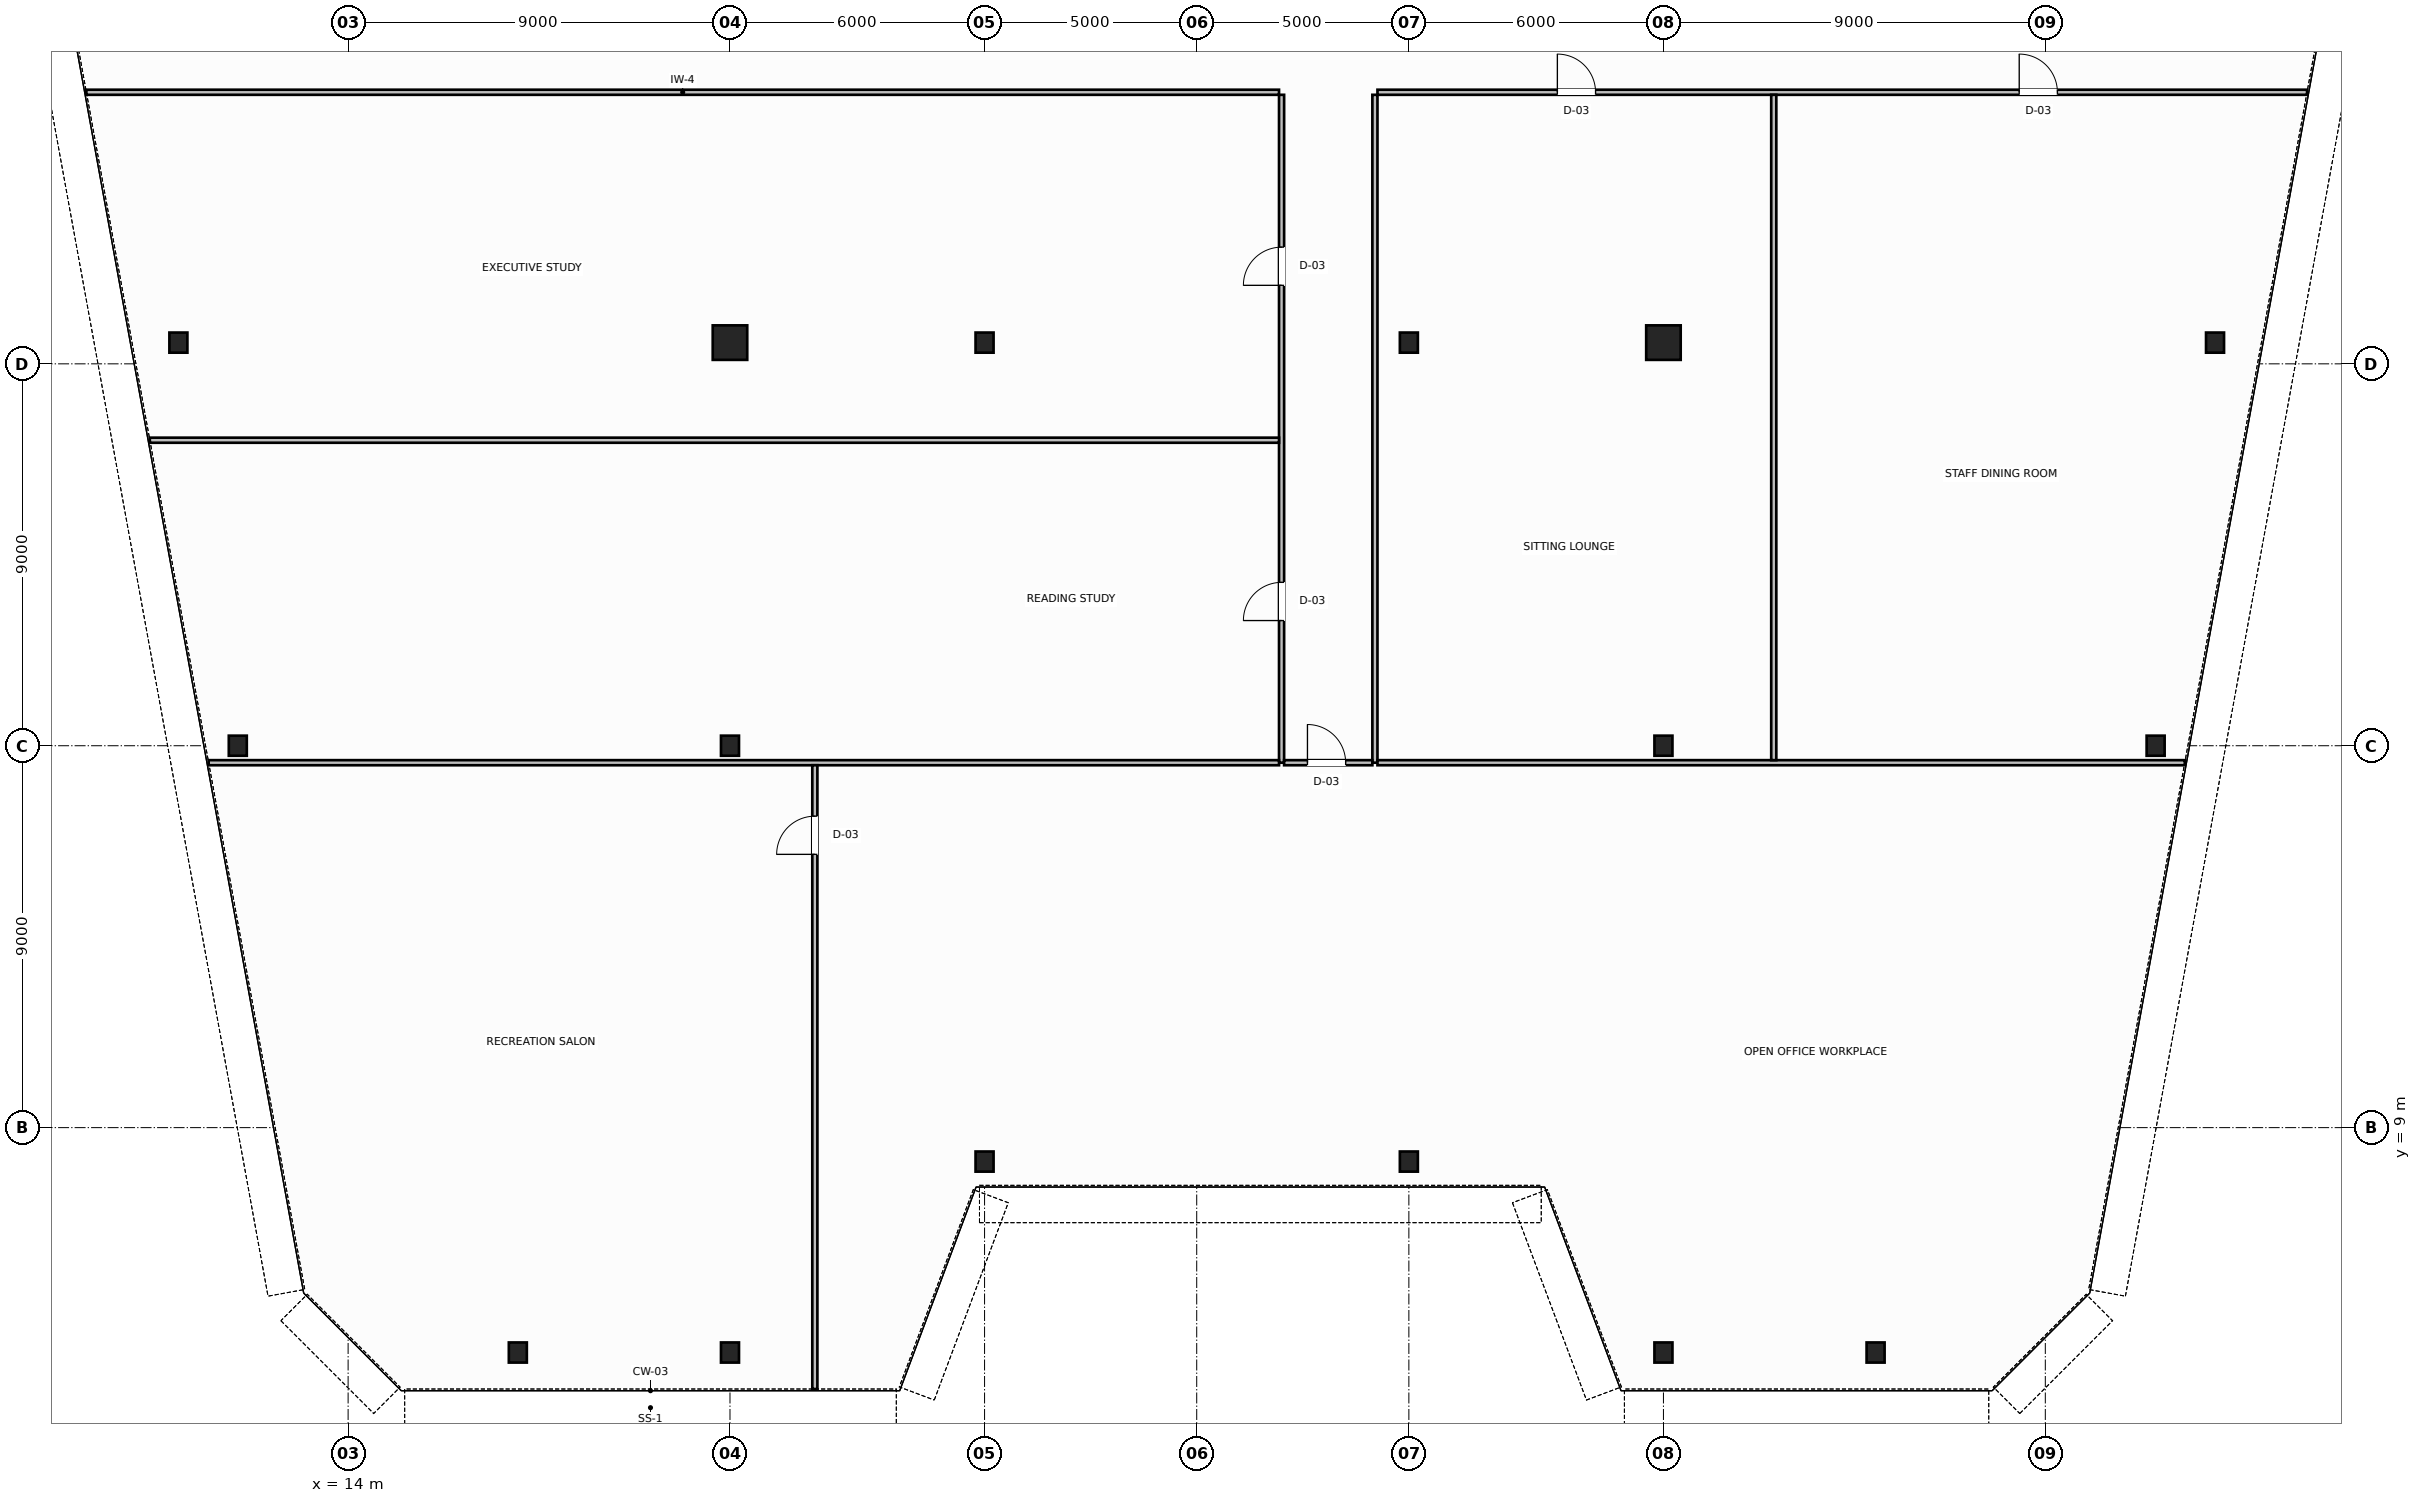
"""IFC4 building model, lengths in metres.
Left out: names, types, materials, properties, quantities, classifications, styles, units other than length and angle.
Written with IfcOpenShell. Run it as: python <this file> out.ifc"""

import sys

from ifc_helpers import new_model, si_unit, direction, frame, frame_2d, origin, origin_2d, place, context, subcontext, project, spatial, rectangle, hollow_circle, i_section, extrude, source, transform, mapped, element, fill, save


model = new_model("IFC4")
c1 = context("Model", 3, precision=1e-05, world=origin(), true_north=direction((0.0, 1.0)))
c2 = subcontext(c1, "Body", "Model", "MODEL_VIEW")
j1 = project(units=[si_unit("LENGTHUNIT", "METRE"), si_unit("PLANEANGLEUNIT", "RADIAN")], contexts=[c1])
p1 = place(None, origin())
s1 = spatial("IfcSite", under=j1, at=p1, CompositionType="ELEMENT")
p2 = place(p1, origin())
s2 = spatial("IfcBuilding", under=s1, at=p2, CompositionType="ELEMENT")
p3 = place(p2, frame((0.0, 0.0, 165.2)))
s3 = spatial("IfcBuildingStorey", under=s2, at=p3, CompositionType="ELEMENT", Elevation=165.2)
m1 = source(origin(), c2, "Body", "SweptSolid", [
    extrude(i_section(OverallWidth=0.424, OverallDepth=0.474, WebThickness=0.047, FlangeThickness=0.065, FilletRadius=0.015, at=origin_2d()), origin(), (0.0, 0.0, 1.0), 3.8),
])
for number, where, z_axis, x_axis in (
    (1, (10.0, 27.5, 0.0), (0.0, 0.0, 1.0), (1.0, 0.0, 0.0)),
    (2, (11.4, 18.0, 0.0), (0.0, 0.0, 1.0), (1.0, 0.0, 0.0)),
    (3, (58.0, 27.5, 0.0), (0.0, 0.0, 1.0), (1.0, 0.0, 0.0)),
    (4, (56.6, 18.0, 0.0), (0.0, 0.0, 1.0), (1.0, 0.0, 0.0)),
):
    element("IfcColumn", number, at=place(p3, frame(where, z_axis=z_axis, x_axis=x_axis)), inside=s3, PredefinedType="COLUMN", context=c2, shape_type="MappedRepresentation", body=[
        mapped(m1, transform((0.0, 0.0, 0.0), scale=1.0)),
    ])
m2 = source(origin(), c2, "Body", "SweptSolid", [
    extrude(hollow_circle(Radius=0.406, WallThickness=0.04, at=origin_2d()), origin(), (0.0, 0.0, 1.0), 3.8),
])
p4 = place(p3, frame((23.0, 27.5, 0.0), z_axis=(0.0, 0.0, 1.0), x_axis=(1.0, 0.0, 0.0)))
e5 = element("IfcColumn", 5, at=p4, inside=s3, PredefinedType="COLUMN", context=c2, shape_type="MappedRepresentation", body=[
    mapped(m2, transform((0.0, 0.0, 0.0), scale=1.0)),
])
m3 = source(origin(), c2, "Body", "SweptSolid", [
    extrude(i_section(OverallWidth=0.424, OverallDepth=0.474, WebThickness=0.047, FlangeThickness=0.065, FilletRadius=0.015, at=origin_2d()), origin(), (0.0, 0.0, 1.0), 3.8),
])
for number, where, z_axis, x_axis in (
    (6, (29.0, 27.5, 0.0), (0.0, 0.0, 1.0), (1.0, 0.0, 0.0)),
    (7, (39.0, 27.5, 0.0), (0.0, 0.0, 1.0), (1.0, 0.0, 0.0)),
):
    element("IfcColumn", number, at=place(p3, frame(where, z_axis=z_axis, x_axis=x_axis)), inside=s3, PredefinedType="COLUMN", context=c2, shape_type="MappedRepresentation", body=[
        mapped(m3, transform((0.0, 0.0, 0.0), scale=1.0)),
    ])
p5 = place(p3, frame((45.0, 27.5, 0.0), z_axis=(0.0, 0.0, 1.0), x_axis=(1.0, 0.0, 0.0)))
e8 = element("IfcColumn", 8, at=p5, inside=s3, PredefinedType="COLUMN", context=c2, shape_type="MappedRepresentation", body=[
    mapped(m2, transform((0.0, 0.0, 0.0), scale=1.0)),
])
for number, where, z_axis, x_axis in (
    (9, (23.0, 18.0, 0.0), (0.0, 0.0, 1.0), (1.0, 0.0, 0.0)),
    (10, (45.0, 18.0, 0.0), (0.0, 0.0, 1.0), (1.0, 0.0, 0.0)),
    (11, (18.0, 3.7, 0.0), (0.0, 0.0, 1.0), (1.0, 0.0, 0.0)),
    (12, (23.0, 3.7, 0.0), (0.0, 0.0, 1.0), (1.0, 0.0, 0.0)),
    (13, (29.0, 8.2, 0.0), (0.0, 0.0, 1.0), (1.0, 0.0, 0.0)),
    (14, (39.0, 8.2, 0.0), (0.0, 0.0, 1.0), (1.0, 0.0, 0.0)),
    (15, (45.0, 3.7, 0.0), (0.0, 0.0, 1.0), (1.0, 0.0, 0.0)),
    (16, (50.0, 3.7, 0.0), (0.0, 0.0, 1.0), (1.0, 0.0, 0.0)),
):
    element("IfcColumn", number, at=place(p3, frame(where, z_axis=z_axis, x_axis=x_axis)), inside=s3, PredefinedType="COLUMN", context=c2, shape_type="MappedRepresentation", body=[
        mapped(m3, transform((0.0, 0.0, 0.0), scale=1.0)),
    ])
p6 = place(p3, frame((7.831, 33.4, 0.0), z_axis=(0.0, 0.0, 1.0), x_axis=(1.0, 0.0, 0.0)))
e17 = element("IfcWall", 17, at=p6, inside=s3, PredefinedType="PARTITIONING", context=c2, shape_type="SweptSolid", body=[
    extrude(rectangle(XDim=28.109, YDim=0.12, at=frame_2d((14.055, 0.0))), origin(), (0.0, 0.0, 1.0), 3.58),
])
p7 = place(p3, frame((38.26, 33.4, 0.0), z_axis=(0.0, 0.0, 1.0), x_axis=(1.0, 0.0, 0.0)))
e18 = element("IfcWall", 18, at=p7, inside=s3, PredefinedType="PARTITIONING", context=c2, shape_type="SweptSolid", body=[
    extrude(rectangle(XDim=21.909, YDim=0.12, at=frame_2d((10.955, 0.0))), origin(), (0.0, 0.0, 1.0), 3.58),
])
p8 = place(p7, frame((4.24, 0.0, 0.0)))
e19 = element("IfcOpeningElement", 19, at=p8, cuts=e18, PredefinedType="OPENING", context=c2, shape_type="SweptSolid", body=[
    extrude(rectangle(XDim=0.9, YDim=2.15, at=frame_2d((0.45, 1.075))), frame((0.0, 0.07, 0.0), z_axis=(0.0, -1.0, 0.0), x_axis=(1.0, 0.0, 0.0)), (0.0, 0.0, 1.0), 0.14),
])
p9 = place(p7, frame((15.125, 0.0, 0.0)))
e20 = element("IfcOpeningElement", 20, at=p9, cuts=e18, PredefinedType="OPENING", context=c2, shape_type="SweptSolid", body=[
    extrude(rectangle(XDim=0.9, YDim=2.15, at=frame_2d((0.45, 1.075))), frame((0.0, 0.07, 0.0), z_axis=(0.0, -1.0, 0.0), x_axis=(1.0, 0.0, 0.0)), (0.0, 0.0, 1.0), 0.14),
])
p10 = place(p3, frame((36.0, 17.6, 0.0), z_axis=(0.0, 0.0, 1.0), x_axis=(0.0, 1.0, 0.0)))
e21 = element("IfcWall", 21, at=p10, inside=s3, PredefinedType="PARTITIONING", context=c2, shape_type="SweptSolid", body=[
    extrude(rectangle(XDim=15.74, YDim=0.12, at=frame_2d((7.87, 0.0))), origin(), (0.0, 0.0, 1.0), 3.58),
])
p11 = place(p10, frame((3.35, 0.0, 0.0)))
e22 = element("IfcOpeningElement", 22, at=p11, cuts=e21, PredefinedType="OPENING", context=c2, shape_type="SweptSolid", body=[
    extrude(rectangle(XDim=0.9, YDim=2.15, at=frame_2d((0.45, 1.075))), frame((0.0, 0.07, 0.0), z_axis=(0.0, -1.0, 0.0), x_axis=(1.0, 0.0, 0.0)), (0.0, 0.0, 1.0), 0.14),
])
p12 = place(p10, frame((11.25, 0.0, 0.0)))
e23 = element("IfcOpeningElement", 23, at=p12, cuts=e21, PredefinedType="OPENING", context=c2, shape_type="SweptSolid", body=[
    extrude(rectangle(XDim=0.9, YDim=2.15, at=frame_2d((0.45, 1.075))), frame((0.0, 0.07, 0.0), z_axis=(0.0, -1.0, 0.0), x_axis=(1.0, 0.0, 0.0)), (0.0, 0.0, 1.0), 0.14),
])
p13 = place(p3, frame((38.2, 17.6, 0.0), z_axis=(0.0, 0.0, 1.0), x_axis=(0.0, 1.0, 0.0)))
e24 = element("IfcWall", 24, at=p13, inside=s3, PredefinedType="PARTITIONING", context=c2, shape_type="SweptSolid", body=[
    extrude(rectangle(XDim=15.74, YDim=0.12, at=frame_2d((7.87, 0.0))), origin(), (0.0, 0.0, 1.0), 3.58),
])
p14 = place(p3, frame((36.06, 17.6, 0.0), z_axis=(0.0, 0.0, 1.0), x_axis=(1.0, 0.0, 0.0)))
e25 = element("IfcWall", 25, at=p14, inside=s3, PredefinedType="PARTITIONING", context=c2, shape_type="SweptSolid", body=[
    extrude(rectangle(XDim=2.08, YDim=0.12, at=frame_2d((1.04, 0.0))), origin(), (0.0, 0.0, 1.0), 3.58),
])
p15 = place(p14, frame((0.55, 0.0, 0.0)))
e26 = element("IfcOpeningElement", 26, at=p15, cuts=e25, PredefinedType="OPENING", context=c2, shape_type="SweptSolid", body=[
    extrude(rectangle(XDim=0.9, YDim=2.15, at=frame_2d((0.45, 1.075))), frame((0.0, 0.07, 0.0), z_axis=(0.0, -1.0, 0.0), x_axis=(1.0, 0.0, 0.0)), (0.0, 0.0, 1.0), 0.14),
])
p16 = place(p3, frame((10.713, 17.6, 0.0), z_axis=(0.0, 0.0, 1.0), x_axis=(1.0, 0.0, 0.0)))
e27 = element("IfcWall", 27, at=p16, inside=s3, PredefinedType="PARTITIONING", context=c2, shape_type="SweptSolid", body=[
    extrude(rectangle(XDim=25.227, YDim=0.12, at=frame_2d((12.614, 0.0))), origin(), (0.0, 0.0, 1.0), 3.58),
])
p17 = place(p3, frame((38.26, 17.6, 0.0), z_axis=(0.0, 0.0, 1.0), x_axis=(1.0, 0.0, 0.0)))
e28 = element("IfcWall", 28, at=p17, inside=s3, PredefinedType="PARTITIONING", context=c2, shape_type="SweptSolid", body=[
    extrude(rectangle(XDim=19.027, YDim=0.12, at=frame_2d((9.514, 0.0))), origin(), (0.0, 0.0, 1.0), 3.58),
])
p18 = place(p3, frame((25.0, 2.84, 0.0), z_axis=(0.0, 0.0, 1.0), x_axis=(0.0, 1.0, 0.0)))
e29 = element("IfcWall", 29, at=p18, inside=s3, PredefinedType="PARTITIONING", context=c2, shape_type="SweptSolid", body=[
    extrude(rectangle(XDim=14.7, YDim=0.12, at=frame_2d((7.35, 0.0))), origin(), (0.0, 0.0, 1.0), 3.58),
])
p19 = place(p18, frame((12.6, 0.0, 0.0)))
e30 = element("IfcOpeningElement", 30, at=p19, cuts=e29, PredefinedType="OPENING", context=c2, shape_type="SweptSolid", body=[
    extrude(rectangle(XDim=0.9, YDim=2.15, at=frame_2d((0.45, 1.075))), frame((0.0, 0.07, 0.0), z_axis=(0.0, -1.0, 0.0), x_axis=(1.0, 0.0, 0.0)), (0.0, 0.0, 1.0), 0.14),
])
p20 = place(p3, frame((9.327, 25.2, 0.0), z_axis=(0.0, 0.0, 1.0), x_axis=(1.0, 0.0, 0.0)))
e31 = element("IfcWall", 31, at=p20, inside=s3, PredefinedType="PARTITIONING", context=c2, shape_type="SweptSolid", body=[
    extrude(rectangle(XDim=26.613, YDim=0.12, at=frame_2d((13.307, 0.0))), origin(), (0.0, 0.0, 1.0), 3.58),
])
p21 = place(p3, frame((47.6, 17.66, 0.0), z_axis=(0.0, 0.0, 1.0), x_axis=(0.0, 1.0, 0.0)))
e32 = element("IfcWall", 32, at=p21, inside=s3, PredefinedType="PARTITIONING", context=c2, shape_type="SweptSolid", body=[
    extrude(rectangle(XDim=15.68, YDim=0.12, at=frame_2d((7.84, 0.0))), origin(), (0.0, 0.0, 1.0), 3.58),
])
m4 = source(origin(), c2, "Body", "SweptSolid", [
    extrude(rectangle(XDim=0.9, YDim=2.15, at=frame_2d((0.45, 1.075))), frame((0.0, 0.025, 0.0), z_axis=(0.0, -1.0, 0.0), x_axis=(1.0, 0.0, 0.0)), (0.0, 0.0, 1.0), 0.05),
])
p22 = place(p19, origin())
e33 = element("IfcDoor", 33, at=p22, inside=s3, OperationType="SINGLE_SWING_RIGHT", PredefinedType="DOOR", context=c2, shape_type="MappedRepresentation", body=[
    mapped(m4, transform((0.0, 0.0, 0.0), scale=1.0)),
])
fill(e30, e33)
p23 = place(p15, origin())
e34 = element("IfcDoor", 34, at=p23, inside=s3, OperationType="SINGLE_SWING_LEFT", PredefinedType="DOOR", context=c2, shape_type="MappedRepresentation", body=[
    mapped(m4, transform((0.0, 0.0, 0.0), scale=1.0)),
])
fill(e26, e34)
p24 = place(p11, origin())
e35 = element("IfcDoor", 35, at=p24, inside=s3, OperationType="SINGLE_SWING_LEFT", PredefinedType="DOOR", context=c2, shape_type="MappedRepresentation", body=[
    mapped(m4, transform((0.0, 0.0, 0.0), scale=1.0)),
])
fill(e22, e35)
p25 = place(p12, origin())
e36 = element("IfcDoor", 36, at=p25, inside=s3, OperationType="SINGLE_SWING_RIGHT", PredefinedType="DOOR", context=c2, shape_type="MappedRepresentation", body=[
    mapped(m4, transform((0.0, 0.0, 0.0), scale=1.0)),
])
fill(e23, e36)
p26 = place(p8, origin())
e37 = element("IfcDoor", 37, at=p26, inside=s3, OperationType="SINGLE_SWING_RIGHT", PredefinedType="DOOR", context=c2, shape_type="MappedRepresentation", body=[
    mapped(m4, transform((0.0, 0.0, 0.0), scale=1.0)),
])
fill(e19, e37)
p27 = place(p9, origin())
e38 = element("IfcDoor", 38, at=p27, inside=s3, OperationType="SINGLE_SWING_LEFT", PredefinedType="DOOR", context=c2, shape_type="MappedRepresentation", body=[
    mapped(m4, transform((0.0, 0.0, 0.0), scale=1.0)),
])
fill(e20, e38)
save(model, sys.argv[1])
